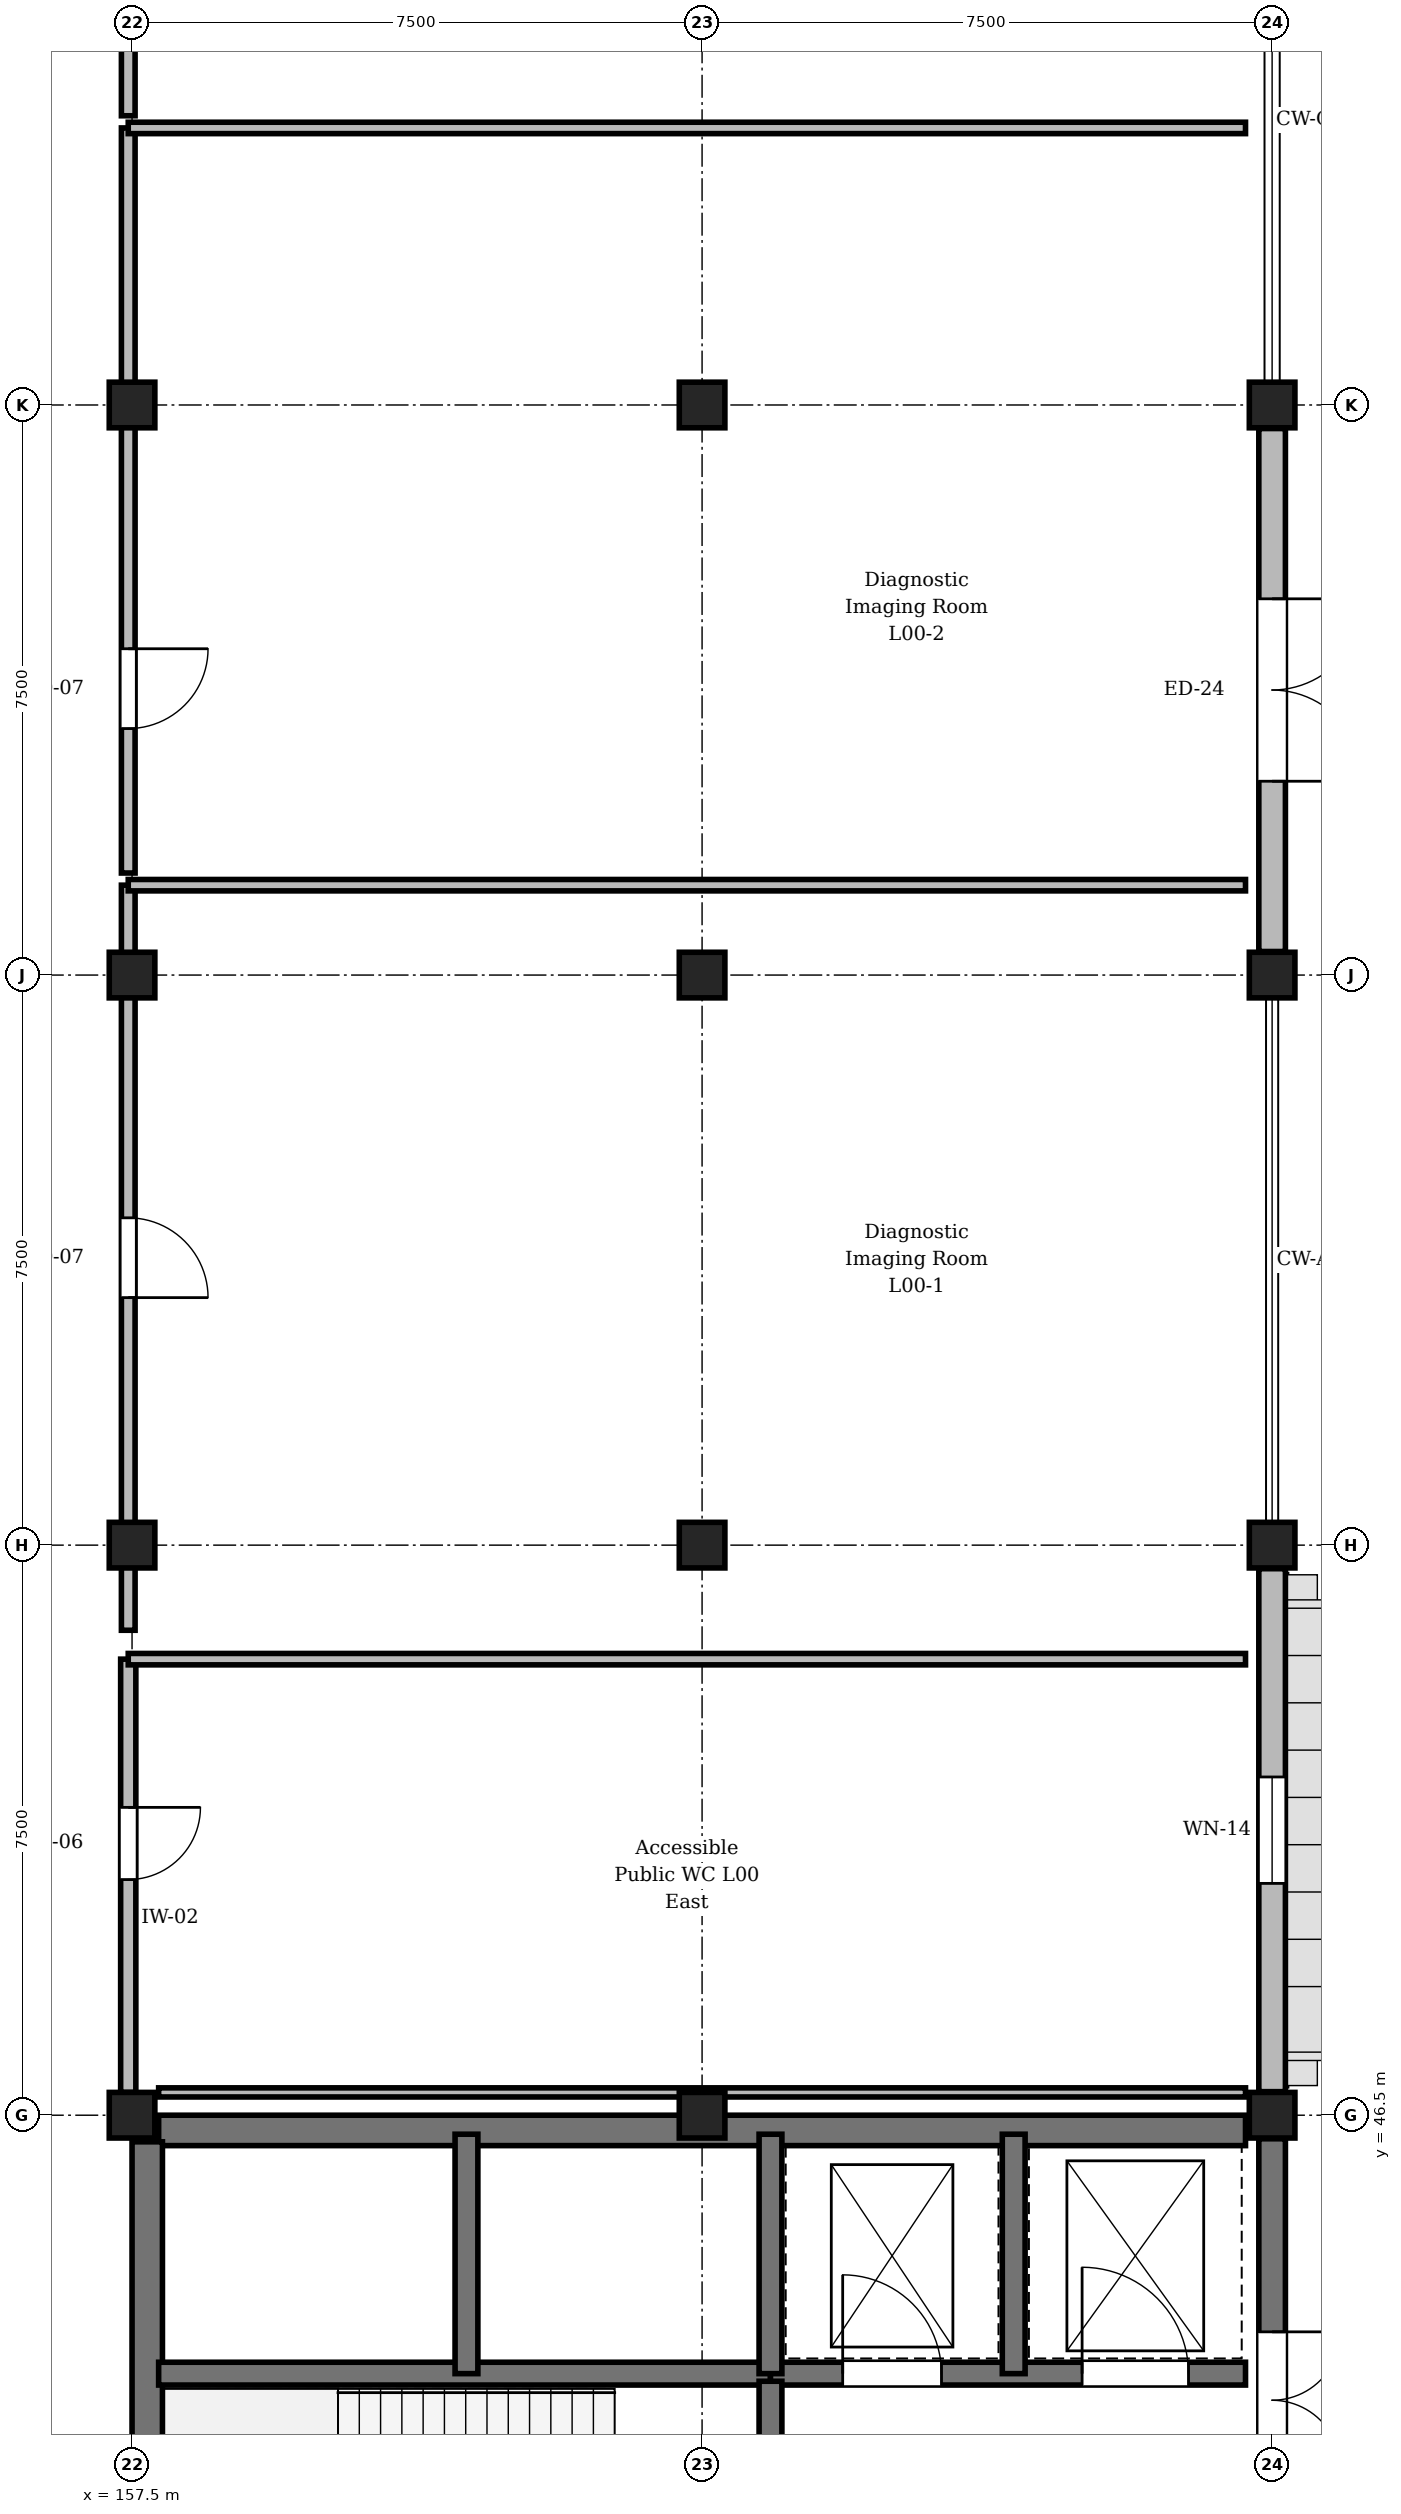
"""IFC4 building model, lengths in metres.
Left out: names, types, materials, properties, quantities, classifications, styles, units other than length and angle.
Written with IfcOpenShell. Run it as: python <this file> out.ifc"""

import sys

from ifc_helpers import new_model, si_unit, direction, frame, frame_2d, origin, origin_2d, place, context, subcontext, project, spatial, rectangle, circle, extrude, element, fill, save


model = new_model("IFC4")
c1 = context("Model", 3, precision=1e-05, world=origin(), true_north=direction((0.0, 1.0)))
c2 = subcontext(c1, "Body", "Model", "MODEL_VIEW")
j1 = project(units=[si_unit("LENGTHUNIT", "METRE"), si_unit("PLANEANGLEUNIT", "RADIAN")], contexts=[c1])
p1 = place(None, origin())
s1 = spatial("IfcSite", under=j1, at=p1, CompositionType="ELEMENT")
p2 = place(p1, origin())
s2 = spatial("IfcBuilding", under=s1, at=p2, CompositionType="ELEMENT")
p3 = place(p2, origin())
s3 = spatial("IfcBuildingStorey", under=s2, at=p3, CompositionType="ELEMENT", Elevation=0.0)
p4 = place(p3, frame((157.5, 46.5, 0.0), z_axis=(0.0, 0.0, 1.0), x_axis=(1.0, 0.0, 0.0)))
e1 = element("IfcColumn", 1, at=p4, inside=s3, PredefinedType="COLUMN", context=c2, shape_type="SweptSolid", body=[
    extrude(circle(Radius=0.3, at=origin_2d()), origin(), (0.0, 0.0, 1.0), 4.8),
])
for number, where, z_axis, x_axis in (
    (2, (157.5, 54.0, 0.0), (0.0, 0.0, 1.0), (1.0, 0.0, 0.0)),
    (3, (157.5, 61.5, 0.0), (0.0, 0.0, 1.0), (1.0, 0.0, 0.0)),
):
    element("IfcColumn", number, at=place(p3, frame(where, z_axis=z_axis, x_axis=x_axis)), inside=s3, PredefinedType="COLUMN", context=c2, shape_type="SweptSolid", body=[
        extrude(rectangle(XDim=0.6, YDim=0.6, at=origin_2d()), origin(), (0.0, 0.0, 1.0), 4.8),
    ])
p5 = place(p3, frame((157.5, 69.0, 0.0), z_axis=(0.0, 0.0, 1.0), x_axis=(1.0, 0.0, 0.0)))
e4 = element("IfcColumn", 4, at=p5, inside=s3, PredefinedType="COLUMN", context=c2, shape_type="SweptSolid", body=[
    extrude(circle(Radius=0.3, at=origin_2d()), origin(), (0.0, 0.0, 1.0), 4.8),
])
for number, where, z_axis, x_axis in (
    (5, (165.0, 46.5, 0.0), (0.0, 0.0, 1.0), (1.0, 0.0, 0.0)),
    (6, (165.0, 54.0, 0.0), (0.0, 0.0, 1.0), (1.0, 0.0, 0.0)),
):
    element("IfcColumn", number, at=place(p3, frame(where, z_axis=z_axis, x_axis=x_axis)), inside=s3, PredefinedType="COLUMN", context=c2, shape_type="SweptSolid", body=[
        extrude(rectangle(XDim=0.6, YDim=0.6, at=origin_2d()), origin(), (0.0, 0.0, 1.0), 4.8),
    ])
p6 = place(p3, frame((165.0, 61.5, 0.0), z_axis=(0.0, 0.0, 1.0), x_axis=(1.0, 0.0, 0.0)))
e7 = element("IfcColumn", 7, at=p6, inside=s3, PredefinedType="COLUMN", context=c2, shape_type="SweptSolid", body=[
    extrude(circle(Radius=0.3, at=origin_2d()), origin(), (0.0, 0.0, 1.0), 4.8),
])
for number, where, z_axis, x_axis in (
    (8, (165.0, 69.0, 0.0), (0.0, 0.0, 1.0), (1.0, 0.0, 0.0)),
    (9, (172.5, 46.5, 0.0), (0.0, 0.0, 1.0), (1.0, 0.0, 0.0)),
):
    element("IfcColumn", number, at=place(p3, frame(where, z_axis=z_axis, x_axis=x_axis)), inside=s3, PredefinedType="COLUMN", context=c2, shape_type="SweptSolid", body=[
        extrude(rectangle(XDim=0.6, YDim=0.6, at=origin_2d()), origin(), (0.0, 0.0, 1.0), 4.8),
    ])
p7 = place(p3, frame((172.5, 54.0, 0.0), z_axis=(0.0, 0.0, 1.0), x_axis=(1.0, 0.0, 0.0)))
e10 = element("IfcColumn", 10, at=p7, inside=s3, PredefinedType="COLUMN", context=c2, shape_type="SweptSolid", body=[
    extrude(circle(Radius=0.3, at=origin_2d()), origin(), (0.0, 0.0, 1.0), 4.8),
])
for number, where, z_axis, x_axis in (
    (11, (172.5, 61.5, 0.0), (0.0, 0.0, 1.0), (1.0, 0.0, 0.0)),
    (12, (172.5, 69.0, 0.0), (0.0, 0.0, 1.0), (1.0, 0.0, 0.0)),
):
    element("IfcColumn", number, at=place(p3, frame(where, z_axis=z_axis, x_axis=x_axis)), inside=s3, PredefinedType="COLUMN", context=c2, shape_type="SweptSolid", body=[
        extrude(rectangle(XDim=0.6, YDim=0.6, at=origin_2d()), origin(), (0.0, 0.0, 1.0), 4.8),
    ])
p8 = place(p3, frame((172.5, 46.19, 0.0), z_axis=(0.0, 0.0, 1.0), x_axis=(0.0, -1.0, 0.0)))
e13 = element("IfcWall", 13, at=p8, inside=s3, PredefinedType="SHEAR", context=c2, shape_type="SweptSolid", body=[
    extrude(rectangle(XDim=6.88, YDim=0.35, at=frame_2d((3.44, 0.0))), origin(), (0.0, 0.0, 1.0), 4.5),
])
p9 = place(p8, frame((2.54, 0.0, 0.0)))
e14 = element("IfcOpeningElement", 14, at=p9, cuts=e13, PredefinedType="OPENING", context=c2, shape_type="SweptSolid", body=[
    extrude(rectangle(XDim=1.8, YDim=2.5, at=frame_2d((0.9, 1.25))), frame((0.0, 0.185, 0.0), z_axis=(0.0, -1.0, 0.0), x_axis=(1.0, 0.0, 0.0)), (0.0, 0.0, 1.0), 0.37),
])
p10 = place(p3, frame((172.5, 53.69, 0.0), z_axis=(0.0, 0.0, 1.0), x_axis=(0.0, -1.0, 0.0)))
e15 = element("IfcWall", 15, at=p10, inside=s3, PredefinedType="STANDARD", context=c2, shape_type="SweptSolid", body=[
    extrude(rectangle(XDim=6.88, YDim=0.35, at=frame_2d((3.44, 0.0))), origin(), (0.0, 0.0, 1.0), 3.9),
])
p11 = place(p10, frame((2.74, 0.0, 0.9)))
e16 = element("IfcOpeningElement", 16, at=p11, cuts=e15, PredefinedType="OPENING", context=c2, shape_type="SweptSolid", body=[
    extrude(rectangle(XDim=1.4, YDim=1.8, at=frame_2d((0.7, 0.9))), frame((0.0, 0.185, 0.0), z_axis=(0.0, -1.0, 0.0), x_axis=(1.0, 0.0, 0.0)), (0.0, 0.0, 1.0), 0.37),
])
p12 = place(p3, frame((172.5, 68.69, 0.0), z_axis=(0.0, 0.0, 1.0), x_axis=(0.0, -1.0, 0.0)))
e17 = element("IfcWall", 17, at=p12, inside=s3, PredefinedType="STANDARD", context=c2, shape_type="SweptSolid", body=[
    extrude(rectangle(XDim=6.88, YDim=0.35, at=frame_2d((3.44, 0.0))), origin(), (0.0, 0.0, 1.0), 3.9),
])
p13 = place(p12, frame((2.24, 0.0, 0.0)))
e18 = element("IfcOpeningElement", 18, at=p13, cuts=e17, PredefinedType="OPENING", context=c2, shape_type="SweptSolid", body=[
    extrude(rectangle(XDim=2.4, YDim=2.7, at=frame_2d((1.2, 1.35))), frame((0.0, 0.185, 0.0), z_axis=(0.0, -1.0, 0.0), x_axis=(1.0, 0.0, 0.0)), (0.0, 0.0, 1.0), 0.37),
])
p14 = place(p3, frame((157.85, 46.3, 0.0), z_axis=(0.0, 0.0, 1.0), x_axis=(1.0, 0.0, 0.0)))
e19 = element("IfcWall", 19, at=p14, inside=s3, PredefinedType="SHEAR", context=c2, shape_type="SweptSolid", body=[
    extrude(rectangle(XDim=14.3, YDim=0.4, at=frame_2d((7.15, 0.0))), origin(), (0.0, 0.0, 1.0), 4.5),
])
p15 = place(p3, frame((157.7, 39.35, 0.0), z_axis=(0.0, 0.0, 1.0), x_axis=(0.0, 1.0, 0.0)))
e20 = element("IfcWall", 20, at=p15, inside=s3, PredefinedType="SHEAR", context=c2, shape_type="SweptSolid", body=[
    extrude(rectangle(XDim=6.8, YDim=0.4, at=frame_2d((3.4, 0.0))), origin(), (0.0, 0.0, 1.0), 4.5),
])
p16 = place(p3, frame((157.85, 43.1, 0.0), z_axis=(0.0, 0.0, 1.0), x_axis=(1.0, 0.0, 0.0)))
e21 = element("IfcWall", 21, at=p16, inside=s3, PredefinedType="SHEAR", context=c2, shape_type="SweptSolid", body=[
    extrude(rectangle(XDim=8.05, YDim=0.3, at=frame_2d((4.025, 0.0))), origin(), (0.0, 0.0, 1.0), 4.5),
])
p17 = place(p3, frame((165.9, 43.1, 0.0), z_axis=(0.0, 0.0, 1.0), x_axis=(1.0, 0.0, 0.0)))
e22 = element("IfcWall", 22, at=p17, inside=s3, PredefinedType="SHEAR", context=c2, shape_type="SweptSolid", body=[
    extrude(rectangle(XDim=6.25, YDim=0.3, at=frame_2d((3.125, 0.0))), origin(), (0.0, 0.0, 1.0), 4.5),
])
p18 = place(p17, frame((0.95, 0.0, 0.0)))
e23 = element("IfcOpeningElement", 23, at=p18, cuts=e22, PredefinedType="OPENING", context=c2, shape_type="SweptSolid", body=[
    extrude(rectangle(XDim=1.3, YDim=2.2, at=frame_2d((0.65, 1.1))), frame((0.0, 0.16, 0.0), z_axis=(0.0, -1.0, 0.0), x_axis=(1.0, 0.0, 0.0)), (0.0, 0.0, 1.0), 0.32),
])
p19 = place(p17, frame((4.1, 0.0, 0.0)))
e24 = element("IfcOpeningElement", 24, at=p19, cuts=e22, PredefinedType="OPENING", context=c2, shape_type="SweptSolid", body=[
    extrude(rectangle(XDim=1.4, YDim=2.25, at=frame_2d((0.7, 1.125))), frame((0.0, 0.16, 0.0), z_axis=(0.0, -1.0, 0.0), x_axis=(1.0, 0.0, 0.0)), (0.0, 0.0, 1.0), 0.32),
])
p20 = place(p3, frame((165.9, 43.0, 0.0), z_axis=(0.0, 0.0, 1.0), x_axis=(0.0, -1.0, 0.0)))
e25 = element("IfcWall", 25, at=p20, inside=s3, PredefinedType="SHEAR", context=c2, shape_type="SweptSolid", body=[
    extrude(rectangle(XDim=3.65, YDim=0.3, at=frame_2d((1.825, 0.0))), origin(), (0.0, 0.0, 1.0), 4.5),
])
p21 = place(p20, frame((1.22, 0.0, 0.0)))
e26 = element("IfcOpeningElement", 26, at=p21, cuts=e25, PredefinedType="OPENING", context=c2, shape_type="SweptSolid", body=[
    extrude(rectangle(XDim=1.2, YDim=2.25, at=frame_2d((0.6, 1.125))), frame((0.0, 0.16, 0.0), z_axis=(0.0, -1.0, 0.0), x_axis=(1.0, 0.0, 0.0)), (0.0, 0.0, 1.0), 0.32),
])
for number, where, z_axis, x_axis in (
    (27, (161.9, 43.1, 0.0), (0.0, 0.0, 1.0), (0.0, 1.0, 0.0)),
    (28, (165.9, 43.1, 0.0), (0.0, 0.0, 1.0), (0.0, 1.0, 0.0)),
    (29, (169.1, 43.1, 0.0), (0.0, 0.0, 1.0), (0.0, 1.0, 0.0)),
):
    element("IfcWall", number, at=place(p3, frame(where, z_axis=z_axis, x_axis=x_axis)), inside=s3, PredefinedType="SHEAR", context=c2, shape_type="SweptSolid", body=[
        extrude(rectangle(XDim=3.15, YDim=0.3, at=frame_2d((1.575, 0.0))), origin(), (0.0, 0.0, 1.0), 4.5),
    ])
p22 = place(p3, frame((157.45, 52.5, 0.0), z_axis=(0.0, 0.0, 1.0), x_axis=(0.0, -1.0, 0.0)))
e30 = element("IfcWall", 30, at=p22, inside=s3, PredefinedType="STANDARD", context=c2, shape_type="SweptSolid", body=[
    extrude(rectangle(XDim=5.7, YDim=0.2, at=frame_2d((2.85, 0.0))), origin(), (0.0, 0.0, 1.0), 3.985),
])
p23 = place(p22, frame((1.95, 0.0, 0.0)))
e31 = element("IfcOpeningElement", 31, at=p23, cuts=e30, PredefinedType="OPENING", context=c2, shape_type="SweptSolid", body=[
    extrude(rectangle(XDim=0.95, YDim=2.15, at=frame_2d((0.475, 1.075))), frame((0.0, 0.11, 0.0), z_axis=(0.0, -1.0, 0.0), x_axis=(1.0, 0.0, 0.0)), (0.0, 0.0, 1.0), 0.22),
])
p24 = place(p3, frame((157.45, 62.683, 0.0), z_axis=(0.0, 0.0, 1.0), x_axis=(0.0, -1.0, 0.0)))
e32 = element("IfcWall", 32, at=p24, inside=s3, PredefinedType="PARTITIONING", context=c2, shape_type="SweptSolid", body=[
    extrude(rectangle(XDim=9.803, YDim=0.18, at=frame_2d((4.901, 0.0))), origin(), (0.0, 0.0, 1.0), 3.935),
])
p25 = place(p24, frame((4.376, 0.0, 0.0)))
e33 = element("IfcOpeningElement", 33, at=p25, cuts=e32, PredefinedType="OPENING", context=c2, shape_type="SweptSolid", body=[
    extrude(rectangle(XDim=1.05, YDim=2.2, at=frame_2d((0.525, 1.1))), frame((0.0, 0.1, 0.0), z_axis=(0.0, -1.0, 0.0), x_axis=(1.0, 0.0, 0.0)), (0.0, 0.0, 1.0), 0.2),
])
p26 = place(p3, frame((157.45, 72.645, 0.0), z_axis=(0.0, 0.0, 1.0), x_axis=(0.0, -1.0, 0.0)))
e34 = element("IfcWall", 34, at=p26, inside=s3, PredefinedType="PARTITIONING", context=c2, shape_type="SweptSolid", body=[
    extrude(rectangle(XDim=9.802, YDim=0.18, at=frame_2d((4.901, 0.0))), origin(), (0.0, 0.0, 1.0), 3.935),
])
p27 = place(p26, frame((6.852, 0.0, 0.0)))
e35 = element("IfcOpeningElement", 35, at=p27, cuts=e34, PredefinedType="OPENING", context=c2, shape_type="SweptSolid", body=[
    extrude(rectangle(XDim=1.05, YDim=2.2, at=frame_2d((0.525, 1.1))), frame((0.0, 0.1, 0.0), z_axis=(0.0, -1.0, 0.0), x_axis=(1.0, 0.0, 0.0)), (0.0, 0.0, 1.0), 0.2),
])
p28 = place(p3, frame((157.45, 82.607, 0.0), z_axis=(0.0, 0.0, 1.0), x_axis=(0.0, -1.0, 0.0)))
e36 = element("IfcWall", 36, at=p28, inside=s3, PredefinedType="PARTITIONING", context=c2, shape_type="SweptSolid", body=[
    extrude(rectangle(XDim=9.802, YDim=0.18, at=frame_2d((4.901, 0.0))), origin(), (0.0, 0.0, 1.0), 3.785),
])
p29 = place(p28, frame((1.075, 0.0, 0.0)))
e37 = element("IfcOpeningElement", 37, at=p29, cuts=e36, PredefinedType="OPENING", context=c2, shape_type="SweptSolid", body=[
    extrude(rectangle(XDim=1.05, YDim=2.2, at=frame_2d((0.525, 1.1))), frame((0.0, 0.1, 0.0), z_axis=(0.0, -1.0, 0.0), x_axis=(1.0, 0.0, 0.0)), (0.0, 0.0, 1.0), 0.2),
])
for number, where, z_axis, x_axis in (
    (38, (157.45, 52.5, 0.0), (0.0, 0.0, 1.0), (1.0, 0.0, 0.0)),
    (39, (157.45, 62.683, 0.0), (0.0, 0.0, 1.0), (1.0, 0.0, 0.0)),
    (40, (157.45, 72.645, 0.0), (0.0, 0.0, 1.0), (1.0, 0.0, 0.0)),
):
    element("IfcWall", number, at=place(p3, frame(where, z_axis=z_axis, x_axis=x_axis)), inside=s3, PredefinedType="PARTITIONING", context=c2, shape_type="SweptSolid", body=[
        extrude(rectangle(XDim=14.7, YDim=0.15, at=frame_2d((7.35, 0.0))), origin(), (0.0, 0.0, 1.0), 4.485),
    ])
p30 = place(p3, frame((157.85, 46.8, 0.0), z_axis=(0.0, 0.0, 1.0), x_axis=(1.0, 0.0, 0.0)))
e41 = element("IfcWall", 41, at=p30, inside=s3, PredefinedType="PARTITIONING", context=c2, shape_type="SweptSolid", body=[
    extrude(rectangle(XDim=14.3, YDim=0.12, at=frame_2d((7.15, 0.0))), origin(), (0.0, 0.0, 1.0), 3.835),
])
p31 = place(p9, origin())
e42 = element("IfcDoor", 42, at=p31, inside=s3, OperationType="DOUBLE_DOOR_SINGLE_SWING", PredefinedType="DOOR", context=c2, shape_type="SweptSolid", body=[
    extrude(rectangle(XDim=1.8, YDim=2.5, at=frame_2d((0.9, 1.25))), frame((0.0, 0.025, 0.0), z_axis=(0.0, -1.0, 0.0), x_axis=(1.0, 0.0, 0.0)), (0.0, 0.0, 1.0), 0.05),
])
fill(e14, e42)
p32 = place(p11, origin())
e43 = element("IfcWindow", 43, at=p32, inside=s3, PartitioningType="SINGLE_PANEL", PredefinedType="WINDOW", context=c2, shape_type="SweptSolid", body=[
    extrude(rectangle(XDim=1.4, YDim=1.8, at=frame_2d((0.7, 0.9))), frame((0.0, 0.03, 0.0), z_axis=(0.0, -1.0, 0.0), x_axis=(1.0, 0.0, 0.0)), (0.0, 0.0, 1.0), 0.06),
])
fill(e16, e43)
p33 = place(p13, origin())
e44 = element("IfcDoor", 44, at=p33, inside=s3, OperationType="DOUBLE_DOOR_SINGLE_SWING", PredefinedType="DOOR", context=c2, shape_type="SweptSolid", body=[
    extrude(rectangle(XDim=2.4, YDim=2.7, at=frame_2d((1.2, 1.35))), frame((0.0, 0.025, 0.0), z_axis=(0.0, -1.0, 0.0), x_axis=(1.0, 0.0, 0.0)), (0.0, 0.0, 1.0), 0.05),
])
fill(e18, e44)
p34 = place(p18, origin())
e45 = element("IfcDoor", 45, at=p34, inside=s3, OperationType="DOUBLE_DOOR_SLIDING", PredefinedType="DOOR", context=c2, shape_type="SweptSolid", body=[
    extrude(rectangle(XDim=1.3, YDim=2.2, at=frame_2d((0.65, 1.1))), frame((0.0, 0.025, 0.0), z_axis=(0.0, -1.0, 0.0), x_axis=(1.0, 0.0, 0.0)), (0.0, 0.0, 1.0), 0.05),
])
fill(e23, e45)
p35 = place(p19, origin())
e46 = element("IfcDoor", 46, at=p35, inside=s3, OperationType="DOUBLE_DOOR_SLIDING", PredefinedType="DOOR", context=c2, shape_type="SweptSolid", body=[
    extrude(rectangle(XDim=1.4, YDim=2.25, at=frame_2d((0.7, 1.125))), frame((0.0, 0.025, 0.0), z_axis=(0.0, -1.0, 0.0), x_axis=(1.0, 0.0, 0.0)), (0.0, 0.0, 1.0), 0.05),
])
fill(e24, e46)
p36 = place(p23, origin())
e47 = element("IfcDoor", 47, at=p36, inside=s3, OperationType="SINGLE_SWING_LEFT", PredefinedType="DOOR", context=c2, shape_type="SweptSolid", body=[
    extrude(rectangle(XDim=0.95, YDim=2.15, at=frame_2d((0.475, 1.075))), frame((0.0, 0.025, 0.0), z_axis=(0.0, -1.0, 0.0), x_axis=(1.0, 0.0, 0.0)), (0.0, 0.0, 1.0), 0.05),
])
fill(e31, e47)
p37 = place(p25, origin())
e48 = element("IfcDoor", 48, at=p37, inside=s3, OperationType="SINGLE_SWING_RIGHT", PredefinedType="DOOR", context=c2, shape_type="SweptSolid", body=[
    extrude(rectangle(XDim=1.05, YDim=2.2, at=frame_2d((0.525, 1.1))), frame((0.0, 0.025, 0.0), z_axis=(0.0, -1.0, 0.0), x_axis=(1.0, 0.0, 0.0)), (0.0, 0.0, 1.0), 0.05),
])
fill(e33, e48)
p38 = place(p27, origin())
e49 = element("IfcDoor", 49, at=p38, inside=s3, OperationType="SINGLE_SWING_LEFT", PredefinedType="DOOR", context=c2, shape_type="SweptSolid", body=[
    extrude(rectangle(XDim=1.05, YDim=2.2, at=frame_2d((0.525, 1.1))), frame((0.0, 0.025, 0.0), z_axis=(0.0, -1.0, 0.0), x_axis=(1.0, 0.0, 0.0)), (0.0, 0.0, 1.0), 0.05),
])
fill(e35, e49)
save(model, sys.argv[1])
